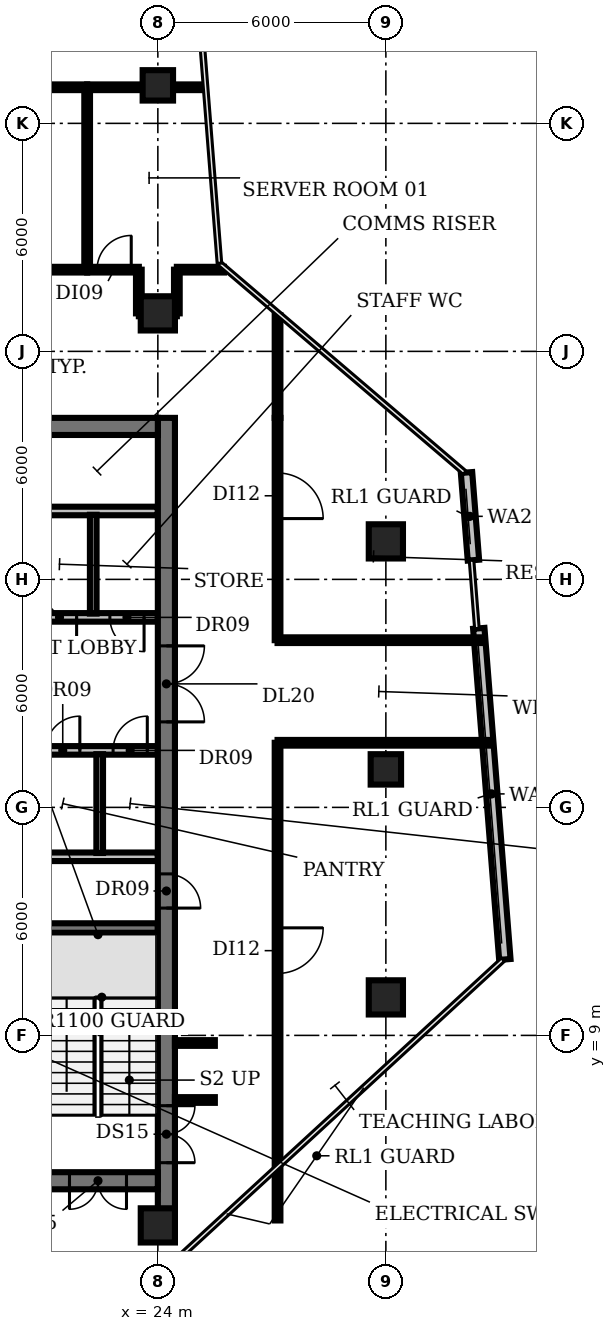
"""IFC4 building model, lengths in metres.
Left out: names, types, materials, properties, quantities, classifications, styles, units other than length and angle.
Written with IfcOpenShell. Run it as: python <this file> out.ifc"""

import sys

from ifc_helpers import new_model, si_unit, direction, frame, frame_2d, origin, origin_2d, place, context, subcontext, project, spatial, rectangle, circle, extrude, element, fill, save


model = new_model("IFC4")
c1 = context("Model", 3, precision=1e-05, world=origin(), true_north=direction((0.0, 1.0)))
c2 = subcontext(c1, "Body", "Model", "MODEL_VIEW")
j1 = project(units=[si_unit("LENGTHUNIT", "METRE"), si_unit("PLANEANGLEUNIT", "RADIAN")], contexts=[c1])
p1 = place(None, origin())
s1 = spatial("IfcSite", under=j1, at=p1, CompositionType="ELEMENT")
p2 = place(p1, origin())
s2 = spatial("IfcBuilding", under=s1, at=p2, CompositionType="ELEMENT")
p3 = place(p2, frame((0.0, 0.0, 209.6)))
s3 = spatial("IfcBuildingStorey", under=s2, at=p3, CompositionType="ELEMENT", Elevation=209.6)
for number, where, z_axis, x_axis in (
    (1, (24.0, 4.0, 0.0), (0.0, 0.0, 1.0), (1.0, 0.0, 0.0)),
    (2, (24.0, 28.0, 0.0), (0.0, 0.0, 1.0), (1.0, 0.0, 0.0)),
):
    element("IfcColumn", number, at=place(p3, frame(where, z_axis=z_axis, x_axis=x_axis)), inside=s3, PredefinedType="COLUMN", context=c2, shape_type="SweptSolid", body=[
        extrude(circle(Radius=0.45, at=origin_2d()), origin(), (0.0, 0.0, 1.0), 3.8),
    ])
p4 = place(p3, frame((24.0, 34.0, 0.0), z_axis=(0.0, 0.0, 1.0), x_axis=(1.0, 0.0, 0.0)))
e3 = element("IfcColumn", 3, at=p4, inside=s3, PredefinedType="COLUMN", context=c2, shape_type="SweptSolid", body=[
    extrude(rectangle(XDim=0.8, YDim=0.8, at=origin_2d()), origin(), (0.0, 0.0, 1.0), 3.8),
])
p5 = place(p3, frame((30.0, 10.0, 0.0), z_axis=(0.0, 0.0, 1.0), x_axis=(1.0, 0.0, 0.0)))
e4 = element("IfcColumn", 4, at=p5, inside=s3, PredefinedType="COLUMN", context=c2, shape_type="SweptSolid", body=[
    extrude(circle(Radius=0.45, at=origin_2d()), origin(), (0.0, 0.0, 1.0), 3.8),
])
p6 = place(p3, frame((30.0, 16.0, 0.0), z_axis=(0.0, 0.0, 1.0), x_axis=(1.0, 0.0, 0.0)))
e5 = element("IfcColumn", 5, at=p6, inside=s3, PredefinedType="COLUMN", context=c2, shape_type="SweptSolid", body=[
    extrude(rectangle(XDim=0.8, YDim=0.8, at=origin_2d()), origin(), (0.0, 0.0, 1.0), 3.8),
])
p7 = place(p3, frame((30.0, 22.0, 0.0), z_axis=(0.0, 0.0, 1.0), x_axis=(1.0, 0.0, 0.0)))
e6 = element("IfcColumn", 6, at=p7, inside=s3, PredefinedType="COLUMN", context=c2, shape_type="SweptSolid", body=[
    extrude(circle(Radius=0.45, at=origin_2d()), origin(), (0.0, 0.0, 1.0), 3.8),
])
p8 = place(p3, frame((33.131, 10.998, 0.0), z_axis=(0.0, 0.0, 1.0), x_axis=(-0.078467243586, 0.996916692449, 0.0)))
e7 = element("IfcWall", 7, at=p8, inside=s3, PredefinedType="SOLIDWALL", context=c2, shape_type="SweptSolid", body=[
    extrude(rectangle(XDim=8.74, YDim=0.3, at=frame_2d((4.37, 0.0))), origin(), (0.0, 0.0, 1.0), 3.8),
])
p9 = place(p3, frame((32.304, 21.506, 0.0), z_axis=(0.0, 0.0, 1.0), x_axis=(-0.078407178347, 0.996921418359, 0.0)))
e8 = element("IfcWall", 8, at=p9, inside=s3, PredefinedType="SOLIDWALL", context=c2, shape_type="SweptSolid", body=[
    extrude(rectangle(XDim=2.313, YDim=0.3, at=frame_2d((1.157, 0.0))), origin(), (0.0, 0.0, 1.0), 3.8),
])
p10 = place(p3, frame((20.85, 11.825, 0.0), z_axis=(0.0, 0.0, 1.0), x_axis=(1.0, 0.0, 0.0)))
e9 = element("IfcWall", 9, at=p10, inside=s3, PredefinedType="SHEAR", context=c2, shape_type="SweptSolid", body=[
    extrude(rectangle(XDim=3.15, YDim=0.25, at=frame_2d((1.575, 0.0))), origin(), (0.0, 0.0, 1.0), 3.8),
])
p11 = place(p3, frame((16.6, 13.7, 0.0), z_axis=(0.0, 0.0, 1.0), x_axis=(1.0, 0.0, 0.0)))
e10 = element("IfcWall", 10, at=p11, inside=s3, PredefinedType="PARTITIONING", context=c2, shape_type="SweptSolid", body=[
    extrude(rectangle(XDim=7.4, YDim=0.225, at=frame_2d((3.7, 0.0))), origin(), (0.0, 0.0, 1.0), 3.8),
])
p12 = place(p3, frame((9.4, 16.5, 0.0), z_axis=(0.0, 0.0, 1.0), x_axis=(1.0, 0.0, 0.0)))
e11 = element("IfcWall", 11, at=p12, inside=s3, PredefinedType="PARTITIONING", context=c2, shape_type="SweptSolid", body=[
    extrude(rectangle(XDim=14.6, YDim=0.225, at=frame_2d((7.3, 0.0))), origin(), (0.0, 0.0, 1.0), 3.8),
])
p13 = place(p12, frame((0.55, 0.0, 0.0)))
e12 = element("IfcOpeningElement", 12, at=p13, cuts=e11, PredefinedType="OPENING", context=c2, shape_type="SweptSolid", body=[
    extrude(rectangle(XDim=0.9, YDim=2.1, at=frame_2d((0.45, 1.05))), frame((0.0, 0.123, 0.0), z_axis=(0.0, -1.0, 0.0), x_axis=(1.0, 0.0, 0.0)), (0.0, 0.0, 1.0), 0.245),
])
p14 = place(p12, frame((6.075, 0.0, 0.0)))
e13 = element("IfcOpeningElement", 13, at=p14, cuts=e11, PredefinedType="OPENING", context=c2, shape_type="SweptSolid", body=[
    extrude(rectangle(XDim=1.0, YDim=2.1, at=frame_2d((0.5, 1.05))), frame((0.0, 0.123, 0.0), z_axis=(0.0, -1.0, 0.0), x_axis=(1.0, 0.0, 0.0)), (0.0, 0.0, 1.0), 0.245),
])
p15 = place(p12, frame((11.647, 0.0, 0.0)))
e14 = element("IfcOpeningElement", 14, at=p15, cuts=e11, PredefinedType="OPENING", context=c2, shape_type="SweptSolid", body=[
    extrude(rectangle(XDim=0.9, YDim=2.1, at=frame_2d((0.45, 1.05))), frame((0.0, 0.123, 0.0), z_axis=(0.0, -1.0, 0.0), x_axis=(1.0, 0.0, 0.0)), (0.0, 0.0, 1.0), 0.245),
])
p16 = place(p12, frame((13.423, 0.0, 0.0)))
e15 = element("IfcOpeningElement", 15, at=p16, cuts=e11, PredefinedType="OPENING", context=c2, shape_type="SweptSolid", body=[
    extrude(rectangle(XDim=0.9, YDim=2.1, at=frame_2d((0.45, 1.05))), frame((0.0, 0.123, 0.0), z_axis=(0.0, -1.0, 0.0), x_axis=(1.0, 0.0, 0.0)), (0.0, 0.0, 1.0), 0.245),
])
p17 = place(p3, frame((24.0, 20.0, 0.0), z_axis=(0.0, 0.0, 1.0), x_axis=(-1.0, 0.0, 0.0)))
e16 = element("IfcWall", 16, at=p17, inside=s3, PredefinedType="PARTITIONING", context=c2, shape_type="SweptSolid", body=[
    extrude(rectangle(XDim=14.6, YDim=0.225, at=frame_2d((7.3, 0.0))), origin(), (0.0, 0.0, 1.0), 3.8),
])
p18 = place(p17, frame((12.75, 0.0, 0.0)))
e17 = element("IfcOpeningElement", 17, at=p18, cuts=e16, PredefinedType="OPENING", context=c2, shape_type="SweptSolid", body=[
    extrude(rectangle(XDim=1.1, YDim=2.1, at=frame_2d((0.55, 1.05))), frame((0.0, 0.123, 0.0), z_axis=(0.0, -1.0, 0.0), x_axis=(1.0, 0.0, 0.0)), (0.0, 0.0, 1.0), 0.245),
])
p19 = place(p17, frame((9.95, 0.0, 0.0)))
e18 = element("IfcOpeningElement", 18, at=p19, cuts=e16, PredefinedType="OPENING", context=c2, shape_type="SweptSolid", body=[
    extrude(rectangle(XDim=1.1, YDim=2.1, at=frame_2d((0.55, 1.05))), frame((0.0, 0.123, 0.0), z_axis=(0.0, -1.0, 0.0), x_axis=(1.0, 0.0, 0.0)), (0.0, 0.0, 1.0), 0.245),
])
p20 = place(p17, frame((7.15, 0.0, 0.0)))
e19 = element("IfcOpeningElement", 19, at=p20, cuts=e16, PredefinedType="OPENING", context=c2, shape_type="SweptSolid", body=[
    extrude(rectangle(XDim=1.1, YDim=2.1, at=frame_2d((0.55, 1.05))), frame((0.0, 0.123, 0.0), z_axis=(0.0, -1.0, 0.0), x_axis=(1.0, 0.0, 0.0)), (0.0, 0.0, 1.0), 0.245),
])
p21 = place(p17, frame((4.35, 0.0, 0.0)))
e20 = element("IfcOpeningElement", 20, at=p21, cuts=e16, PredefinedType="OPENING", context=c2, shape_type="SweptSolid", body=[
    extrude(rectangle(XDim=1.1, YDim=2.1, at=frame_2d((0.55, 1.05))), frame((0.0, 0.123, 0.0), z_axis=(0.0, -1.0, 0.0), x_axis=(1.0, 0.0, 0.0)), (0.0, 0.0, 1.0), 0.245),
])
p22 = place(p17, frame((2.137, 0.0, 0.0)))
e21 = element("IfcOpeningElement", 21, at=p22, cuts=e16, PredefinedType="OPENING", context=c2, shape_type="SweptSolid", body=[
    extrude(rectangle(XDim=0.9, YDim=2.1, at=frame_2d((0.45, 1.05))), frame((0.0, 0.123, 0.0), z_axis=(0.0, -1.0, 0.0), x_axis=(1.0, 0.0, 0.0)), (0.0, 0.0, 1.0), 0.245),
])
p23 = place(p17, frame((0.363, 0.0, 0.0)))
e22 = element("IfcOpeningElement", 22, at=p23, cuts=e16, PredefinedType="OPENING", context=c2, shape_type="SweptSolid", body=[
    extrude(rectangle(XDim=0.9, YDim=2.1, at=frame_2d((0.45, 1.05))), frame((0.0, 0.123, 0.0), z_axis=(0.0, -1.0, 0.0), x_axis=(1.0, 0.0, 0.0)), (0.0, 0.0, 1.0), 0.245),
])
p24 = place(p3, frame((9.4, 22.8, 0.0), z_axis=(0.0, 0.0, 1.0), x_axis=(1.0, 0.0, 0.0)))
e23 = element("IfcWall", 23, at=p24, inside=s3, PredefinedType="PARTITIONING", context=c2, shape_type="SweptSolid", body=[
    extrude(rectangle(XDim=14.6, YDim=0.225, at=frame_2d((7.3, 0.0))), origin(), (0.0, 0.0, 1.0), 3.8),
])
for number, where, z_axis, x_axis in (
    (24, (22.3, 20.1, 0.0), (0.0, 0.0, 1.0), (0.0, 1.0, 0.0)),
    (25, (22.47, 13.8, 0.0), (0.0, 0.0, 1.0), (0.0, 1.0, 0.0)),
):
    element("IfcWall", number, at=place(p3, frame(where, z_axis=z_axis, x_axis=x_axis)), inside=s3, PredefinedType="PARTITIONING", context=c2, shape_type="SweptSolid", body=[
        extrude(rectangle(XDim=2.6, YDim=0.175, at=frame_2d((1.3, 0.0))), origin(), (0.0, 0.0, 1.0), 3.8),
    ])
p25 = place(p3, frame((24.225, 25.25, 0.0), z_axis=(0.0, 0.0, 1.0), x_axis=(0.0, -1.0, 0.0)))
e26 = element("IfcWall", 26, at=p25, inside=s3, PredefinedType="SHEAR", context=c2, shape_type="SweptSolid", body=[
    extrude(rectangle(XDim=20.83, YDim=0.45, at=frame_2d((10.415, 0.0))), origin(), (0.0, 0.0, 1.0), 3.8),
])
p26 = place(p25, frame((18.1, 0.0, 0.0)))
e27 = element("IfcOpeningElement", 27, at=p26, cuts=e26, PredefinedType="OPENING", context=c2, shape_type="SweptSolid", body=[
    extrude(rectangle(XDim=1.5, YDim=2.1, at=frame_2d((0.75, 1.05))), frame((0.0, 0.235, 0.0), z_axis=(0.0, -1.0, 0.0), x_axis=(1.0, 0.0, 0.0)), (0.0, 0.0, 1.0), 0.47),
])
p27 = place(p25, frame((12.0, 0.0, 0.0)))
e28 = element("IfcOpeningElement", 28, at=p27, cuts=e26, PredefinedType="OPENING", context=c2, shape_type="SweptSolid", body=[
    extrude(rectangle(XDim=0.9, YDim=2.1, at=frame_2d((0.45, 1.05))), frame((0.0, 0.235, 0.0), z_axis=(0.0, -1.0, 0.0), x_axis=(1.0, 0.0, 0.0)), (0.0, 0.0, 1.0), 0.47),
])
p28 = place(p25, frame((6.0, 0.0, 0.0)))
e29 = element("IfcOpeningElement", 29, at=p28, cuts=e26, PredefinedType="OPENING", context=c2, shape_type="SweptSolid", body=[
    extrude(rectangle(XDim=2.0, YDim=2.1, at=frame_2d((1.0, 1.05))), frame((0.0, 0.235, 0.0), z_axis=(0.0, -1.0, 0.0), x_axis=(1.0, 0.0, 0.0)), (0.0, 0.0, 1.0), 0.47),
])
p29 = place(p3, frame((24.0, 5.175, 0.0), z_axis=(0.0, 0.0, 1.0), x_axis=(-1.0, 0.0, 0.0)))
e30 = element("IfcWall", 30, at=p29, inside=s3, PredefinedType="SHEAR", context=c2, shape_type="SweptSolid", body=[
    extrude(rectangle(XDim=18.0, YDim=0.45, at=frame_2d((9.0, 0.0))), origin(), (0.0, 0.0, 1.0), 3.8),
])
p30 = place(p29, frame((0.825, 0.0, 0.0)))
e31 = element("IfcOpeningElement", 31, at=p30, cuts=e30, PredefinedType="OPENING", context=c2, shape_type="SweptSolid", body=[
    extrude(rectangle(XDim=1.5, YDim=2.1, at=frame_2d((0.75, 1.05))), frame((0.0, 0.235, 0.0), z_axis=(0.0, -1.0, 0.0), x_axis=(1.0, 0.0, 0.0)), (0.0, 0.0, 1.0), 0.47),
])
p31 = place(p29, frame((15.675, 0.0, 0.0)))
e32 = element("IfcOpeningElement", 32, at=p31, cuts=e30, PredefinedType="OPENING", context=c2, shape_type="SweptSolid", body=[
    extrude(rectangle(XDim=1.5, YDim=2.1, at=frame_2d((0.75, 1.05))), frame((0.0, 0.235, 0.0), z_axis=(0.0, -1.0, 0.0), x_axis=(1.0, 0.0, 0.0)), (0.0, 0.0, 1.0), 0.47),
])
p32 = place(p29, frame((13.0, 0.0, 0.0)))
e33 = element("IfcOpeningElement", 33, at=p32, cuts=e30, PredefinedType="OPENING", context=c2, shape_type="SweptSolid", body=[
    extrude(rectangle(XDim=1.2, YDim=2.1, at=frame_2d((0.6, 1.05))), frame((0.0, 0.235, 0.0), z_axis=(0.0, -1.0, 0.0), x_axis=(1.0, 0.0, 0.0)), (0.0, 0.0, 1.0), 0.47),
])
p33 = place(p29, frame((4.4, 0.0, 0.0)))
e34 = element("IfcOpeningElement", 34, at=p33, cuts=e30, PredefinedType="OPENING", context=c2, shape_type="SweptSolid", body=[
    extrude(rectangle(XDim=1.0, YDim=2.1, at=frame_2d((0.5, 1.05))), frame((0.0, 0.235, 0.0), z_axis=(0.0, -1.0, 0.0), x_axis=(1.0, 0.0, 0.0)), (0.0, 0.0, 1.0), 0.47),
])
p34 = place(p3, frame((6.0, 25.025, 0.0), z_axis=(0.0, 0.0, 1.0), x_axis=(1.0, 0.0, 0.0)))
e35 = element("IfcWall", 35, at=p34, inside=s3, PredefinedType="SHEAR", context=c2, shape_type="SweptSolid", body=[
    extrude(rectangle(XDim=18.0, YDim=0.45, at=frame_2d((9.0, 0.0))), origin(), (0.0, 0.0, 1.0), 3.8),
])
p35 = place(p3, frame((12.42, 33.95, 0.0), z_axis=(0.0, 0.0, 1.0), x_axis=(1.0, 0.0, 0.0)))
e36 = element("IfcWall", 36, at=p35, inside=s3, PredefinedType="PARTITIONING", context=c2, shape_type="SweptSolid", body=[
    extrude(rectangle(XDim=9.72, YDim=0.15, at=frame_2d((4.86, 0.0))), origin(), (0.0, 0.0, 1.0), 2.83),
])
p36 = place(p3, frame((18.4, 29.15, 0.0), z_axis=(0.0, 0.0, 1.0), x_axis=(1.0, 0.0, 0.0)))
e37 = element("IfcWall", 37, at=p36, inside=s3, PredefinedType="PARTITIONING", context=c2, shape_type="SweptSolid", body=[
    extrude(rectangle(XDim=3.74, YDim=0.15, at=frame_2d((1.87, 0.0))), origin(), (0.0, 0.0, 1.0), 2.83),
])
p37 = place(p3, frame((22.14, 29.15, 0.0), z_axis=(0.0, 0.0, 1.0), x_axis=(0.0, 1.0, 0.0)))
e38 = element("IfcWall", 38, at=p37, inside=s3, PredefinedType="PARTITIONING", context=c2, shape_type="SweptSolid", body=[
    extrude(rectangle(XDim=4.8, YDim=0.15, at=frame_2d((2.4, 0.0))), origin(), (0.0, 0.0, 1.0), 2.83),
])
p38 = place(p3, frame((22.14, 29.15, 0.0), z_axis=(0.0, 0.0, 1.0), x_axis=(1.0, 0.0, 0.0)))
e39 = element("IfcWall", 39, at=p38, inside=s3, PredefinedType="PARTITIONING", context=c2, shape_type="SweptSolid", body=[
    extrude(rectangle(XDim=1.36, YDim=0.15, at=frame_2d((0.68, 0.0))), origin(), (0.0, 0.0, 1.0), 2.83),
])
p39 = place(p38, frame((0.26, 0.0, 0.0)))
e40 = element("IfcOpeningElement", 40, at=p39, cuts=e39, PredefinedType="OPENING", context=c2, shape_type="SweptSolid", body=[
    extrude(rectangle(XDim=0.9, YDim=2.1, at=frame_2d((0.45, 1.05))), frame((0.0, 0.085, 0.0), z_axis=(0.0, -1.0, 0.0), x_axis=(1.0, 0.0, 0.0)), (0.0, 0.0, 1.0), 0.17),
])
p40 = place(p3, frame((22.14, 33.95, 0.0), z_axis=(0.0, 0.0, 1.0), x_axis=(1.0, 0.0, 0.0)))
e41 = element("IfcWall", 41, at=p40, inside=s3, PredefinedType="PARTITIONING", context=c2, shape_type="SweptSolid", body=[
    extrude(rectangle(XDim=3.07, YDim=0.15, at=frame_2d((1.535, 0.0))), origin(), (0.0, 0.0, 1.0), 2.83),
])
p41 = place(p3, frame((23.5, 28.0, 0.0), z_axis=(0.0, 0.0, 1.0), x_axis=(0.0, 1.0, 0.0)))
e42 = element("IfcWall", 42, at=p41, inside=s3, PredefinedType="PARTITIONING", context=c2, shape_type="SweptSolid", body=[
    extrude(rectangle(XDim=1.15, YDim=0.15, at=frame_2d((0.575, 0.0))), origin(), (0.0, 0.0, 1.0), 2.83),
])
p42 = place(p3, frame((23.5, 28.0, 0.0), z_axis=(0.0, 0.0, 1.0), x_axis=(1.0, 0.0, 0.0)))
e43 = element("IfcWall", 43, at=p42, inside=s3, PredefinedType="PARTITIONING", context=c2, shape_type="SweptSolid", body=[
    extrude(rectangle(XDim=1.0, YDim=0.15, at=frame_2d((0.5, 0.0))), origin(), (0.0, 0.0, 1.0), 2.83),
])
for number, where, z_axis, x_axis in (
    (44, (24.45, 7.3, 0.0), (0.0, 0.0, 1.0), (1.0, 0.0, 0.0)),
    (45, (24.45, 8.8, 0.0), (0.0, 0.0, 1.0), (1.0, 0.0, 0.0)),
):
    element("IfcWall", number, at=place(p3, frame(where, z_axis=z_axis, x_axis=x_axis)), inside=s3, PredefinedType="PARTITIONING", context=c2, shape_type="SweptSolid", body=[
        extrude(rectangle(XDim=1.05, YDim=0.15, at=frame_2d((0.525, 0.0))), origin(), (0.0, 0.0, 1.0), 2.83),
    ])
p43 = place(p3, frame((24.5, 28.0, 0.0), z_axis=(0.0, 0.0, 1.0), x_axis=(0.0, 1.0, 0.0)))
e46 = element("IfcWall", 46, at=p43, inside=s3, PredefinedType="PARTITIONING", context=c2, shape_type="SweptSolid", body=[
    extrude(rectangle(XDim=1.15, YDim=0.15, at=frame_2d((0.575, 0.0))), origin(), (0.0, 0.0, 1.0), 2.83),
])
p44 = place(p3, frame((24.5, 29.15, 0.0), z_axis=(0.0, 0.0, 1.0), x_axis=(1.0, 0.0, 0.0)))
e47 = element("IfcWall", 47, at=p44, inside=s3, PredefinedType="PARTITIONING", context=c2, shape_type="SweptSolid", body=[
    extrude(rectangle(XDim=1.24, YDim=0.15, at=frame_2d((0.62, 0.0))), origin(), (0.0, 0.0, 1.0), 2.83),
])
p45 = place(p3, frame((27.15, 16.7, 0.0), z_axis=(0.0, 0.0, 1.0), x_axis=(0.0, -1.0, 0.0)))
e48 = element("IfcWall", 48, at=p45, inside=s3, PredefinedType="PARTITIONING", context=c2, shape_type="SweptSolid", body=[
    extrude(rectangle(XDim=12.57, YDim=0.15, at=frame_2d((6.285, 0.0))), origin(), (0.0, 0.0, 1.0), 2.83),
])
p46 = place(p45, frame((4.87, 0.0, 0.0)))
e49 = element("IfcOpeningElement", 49, at=p46, cuts=e48, PredefinedType="OPENING", context=c2, shape_type="SweptSolid", body=[
    extrude(rectangle(XDim=1.2, YDim=2.1, at=frame_2d((0.6, 1.05))), frame((0.0, 0.085, 0.0), z_axis=(0.0, -1.0, 0.0), x_axis=(1.0, 0.0, 0.0)), (0.0, 0.0, 1.0), 0.17),
])
p47 = place(p3, frame((27.15, 16.7, 0.0), z_axis=(0.0, 0.0, 1.0), x_axis=(1.0, 0.0, 0.0)))
e50 = element("IfcWall", 50, at=p47, inside=s3, PredefinedType="PARTITIONING", context=c2, shape_type="SweptSolid", body=[
    extrude(rectangle(XDim=5.542, YDim=0.15, at=frame_2d((2.771, 0.0))), origin(), (0.0, 0.0, 1.0), 2.83),
])
p48 = place(p3, frame((27.15, 19.4, 0.0), z_axis=(0.0, 0.0, 1.0), x_axis=(1.0, 0.0, 0.0)))
e51 = element("IfcWall", 51, at=p48, inside=s3, PredefinedType="PARTITIONING", context=c2, shape_type="SweptSolid", body=[
    extrude(rectangle(XDim=5.33, YDim=0.15, at=frame_2d((2.665, 0.0))), origin(), (0.0, 0.0, 1.0), 2.83),
])
p49 = place(p3, frame((27.15, 25.25, 0.0), z_axis=(0.0, 0.0, 1.0), x_axis=(0.0, -1.0, 0.0)))
e52 = element("IfcWall", 52, at=p49, inside=s3, PredefinedType="PARTITIONING", context=c2, shape_type="SweptSolid", body=[
    extrude(rectangle(XDim=5.85, YDim=0.15, at=frame_2d((2.925, 0.0))), origin(), (0.0, 0.0, 1.0), 2.83),
])
p50 = place(p49, frame((1.45, 0.0, 0.0)))
e53 = element("IfcOpeningElement", 53, at=p50, cuts=e52, PredefinedType="OPENING", context=c2, shape_type="SweptSolid", body=[
    extrude(rectangle(XDim=1.2, YDim=2.1, at=frame_2d((0.6, 1.05))), frame((0.0, 0.085, 0.0), z_axis=(0.0, -1.0, 0.0), x_axis=(1.0, 0.0, 0.0)), (0.0, 0.0, 1.0), 0.17),
])
p51 = place(p3, frame((27.15, 25.25, 0.0), z_axis=(0.0, 0.0, 1.0), x_axis=(0.0, 1.0, 0.0)))
e54 = element("IfcWall", 54, at=p51, inside=s3, PredefinedType="PARTITIONING", context=c2, shape_type="SweptSolid", body=[
    extrude(rectangle(XDim=2.7, YDim=0.15, at=frame_2d((1.35, 0.0))), origin(), (0.0, 0.0, 1.0), 2.83),
])
p52 = place(p15, origin())
e55 = element("IfcDoor", 55, at=p52, inside=s3, OperationType="SINGLE_SWING_RIGHT", PredefinedType="DOOR", context=c2, shape_type="SweptSolid", body=[
    extrude(rectangle(XDim=0.9, YDim=2.1, at=frame_2d((0.45, 1.05))), frame((0.0, 0.025, 0.0), z_axis=(0.0, -1.0, 0.0), x_axis=(1.0, 0.0, 0.0)), (0.0, 0.0, 1.0), 0.05),
])
fill(e14, e55)
p53 = place(p16, origin())
e56 = element("IfcDoor", 56, at=p53, inside=s3, OperationType="SINGLE_SWING_RIGHT", PredefinedType="DOOR", context=c2, shape_type="SweptSolid", body=[
    extrude(rectangle(XDim=0.9, YDim=2.1, at=frame_2d((0.45, 1.05))), frame((0.0, 0.025, 0.0), z_axis=(0.0, -1.0, 0.0), x_axis=(1.0, 0.0, 0.0)), (0.0, 0.0, 1.0), 0.05),
])
fill(e15, e56)
p54 = place(p22, origin())
e57 = element("IfcDoor", 57, at=p54, inside=s3, OperationType="SINGLE_SWING_LEFT", PredefinedType="DOOR", context=c2, shape_type="SweptSolid", body=[
    extrude(rectangle(XDim=0.9, YDim=2.1, at=frame_2d((0.45, 1.05))), frame((0.0, 0.025, 0.0), z_axis=(0.0, -1.0, 0.0), x_axis=(1.0, 0.0, 0.0)), (0.0, 0.0, 1.0), 0.05),
])
fill(e21, e57)
p55 = place(p23, origin())
e58 = element("IfcDoor", 58, at=p55, inside=s3, OperationType="SINGLE_SWING_LEFT", PredefinedType="DOOR", context=c2, shape_type="SweptSolid", body=[
    extrude(rectangle(XDim=0.9, YDim=2.1, at=frame_2d((0.45, 1.05))), frame((0.0, 0.025, 0.0), z_axis=(0.0, -1.0, 0.0), x_axis=(1.0, 0.0, 0.0)), (0.0, 0.0, 1.0), 0.05),
])
fill(e22, e58)
p56 = place(p26, origin())
e59 = element("IfcDoor", 59, at=p56, inside=s3, OperationType="DOUBLE_DOOR_SINGLE_SWING", PredefinedType="DOOR", context=c2, shape_type="SweptSolid", body=[
    extrude(rectangle(XDim=1.5, YDim=2.1, at=frame_2d((0.75, 1.05))), frame((0.0, 0.025, 0.0), z_axis=(0.0, -1.0, 0.0), x_axis=(1.0, 0.0, 0.0)), (0.0, 0.0, 1.0), 0.05),
])
fill(e27, e59)
p57 = place(p27, origin())
e60 = element("IfcDoor", 60, at=p57, inside=s3, OperationType="SINGLE_SWING_RIGHT", PredefinedType="DOOR", context=c2, shape_type="SweptSolid", body=[
    extrude(rectangle(XDim=0.9, YDim=2.1, at=frame_2d((0.45, 1.05))), frame((0.0, 0.025, 0.0), z_axis=(0.0, -1.0, 0.0), x_axis=(1.0, 0.0, 0.0)), (0.0, 0.0, 1.0), 0.05),
])
fill(e28, e60)
p58 = place(p28, origin())
e61 = element("IfcDoor", 61, at=p58, inside=s3, OperationType="DOUBLE_DOOR_SINGLE_SWING", PredefinedType="DOOR", context=c2, shape_type="SweptSolid", body=[
    extrude(rectangle(XDim=2.0, YDim=2.1, at=frame_2d((1.0, 1.05))), frame((0.0, 0.025, 0.0), z_axis=(0.0, -1.0, 0.0), x_axis=(1.0, 0.0, 0.0)), (0.0, 0.0, 1.0), 0.05),
])
fill(e29, e61)
p59 = place(p30, origin())
e62 = element("IfcDoor", 62, at=p59, inside=s3, OperationType="DOUBLE_DOOR_SINGLE_SWING", PredefinedType="DOOR", context=c2, shape_type="SweptSolid", body=[
    extrude(rectangle(XDim=1.5, YDim=2.1, at=frame_2d((0.75, 1.05))), frame((0.0, 0.025, 0.0), z_axis=(0.0, -1.0, 0.0), x_axis=(1.0, 0.0, 0.0)), (0.0, 0.0, 1.0), 0.05),
])
fill(e31, e62)
p60 = place(p39, origin())
e63 = element("IfcDoor", 63, at=p60, inside=s3, OperationType="SINGLE_SWING_RIGHT", PredefinedType="DOOR", context=c2, shape_type="SweptSolid", body=[
    extrude(rectangle(XDim=0.9, YDim=2.1, at=frame_2d((0.45, 1.05))), frame((0.0, 0.025, 0.0), z_axis=(0.0, -1.0, 0.0), x_axis=(1.0, 0.0, 0.0)), (0.0, 0.0, 1.0), 0.05),
])
fill(e40, e63)
p61 = place(p46, origin())
e64 = element("IfcDoor", 64, at=p61, inside=s3, OperationType="SINGLE_SWING_LEFT", PredefinedType="DOOR", context=c2, shape_type="SweptSolid", body=[
    extrude(rectangle(XDim=1.2, YDim=2.1, at=frame_2d((0.6, 1.05))), frame((0.0, 0.025, 0.0), z_axis=(0.0, -1.0, 0.0), x_axis=(1.0, 0.0, 0.0)), (0.0, 0.0, 1.0), 0.05),
])
fill(e49, e64)
p62 = place(p50, origin())
e65 = element("IfcDoor", 65, at=p62, inside=s3, OperationType="SINGLE_SWING_RIGHT", PredefinedType="DOOR", context=c2, shape_type="SweptSolid", body=[
    extrude(rectangle(XDim=1.2, YDim=2.1, at=frame_2d((0.6, 1.05))), frame((0.0, 0.025, 0.0), z_axis=(0.0, -1.0, 0.0), x_axis=(1.0, 0.0, 0.0)), (0.0, 0.0, 1.0), 0.05),
])
fill(e53, e65)
save(model, sys.argv[1])
